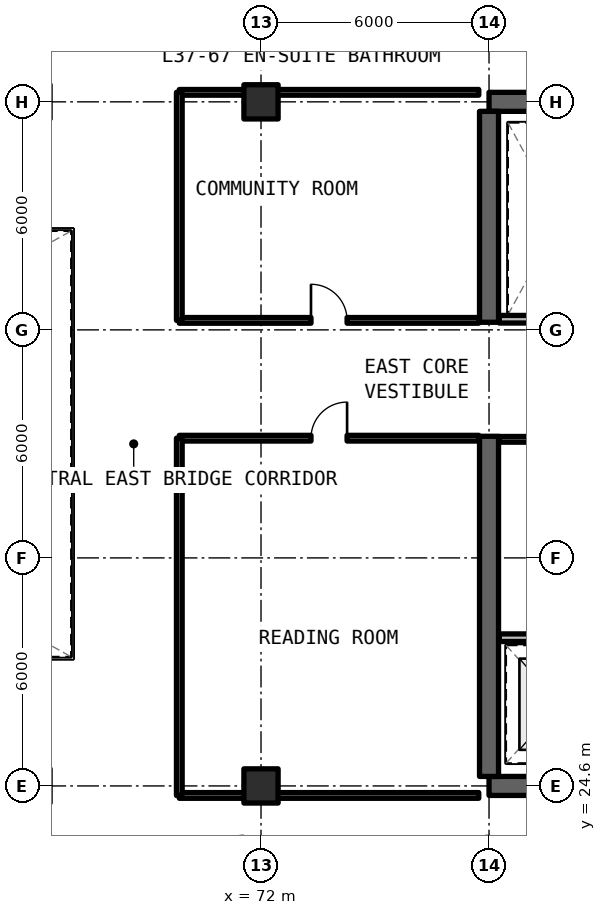
"""IFC4 building model, lengths in metres.
Left out: names, types, materials, properties, quantities, classifications, styles, units other than length and angle.
Written with IfcOpenShell. Run it as: python <this file> out.ifc"""

import sys

from ifc_helpers import new_model, si_unit, direction, frame, frame_2d, origin, origin_2d, place, context, subcontext, project, spatial, rectangle, extrude, element, fill, save


model = new_model("IFC4")
c1 = context("Model", 3, precision=1e-05, world=origin(), true_north=direction((0.0, 1.0)))
c2 = subcontext(c1, "Body", "Model", "MODEL_VIEW")
j1 = project(units=[si_unit("LENGTHUNIT", "METRE"), si_unit("PLANEANGLEUNIT", "RADIAN")], contexts=[c1])
p1 = place(None, origin())
s1 = spatial("IfcSite", under=j1, at=p1, CompositionType="ELEMENT")
p2 = place(p1, origin())
s2 = spatial("IfcBuilding", under=s1, at=p2, CompositionType="ELEMENT")
p3 = place(p2, frame((0.0, 0.0, 135.3)))
s3 = spatial("IfcBuildingStorey", under=s2, at=p3, CompositionType="ELEMENT", Elevation=135.3)
for number, where, z_axis, x_axis in (
    (1, (78.0, 24.6, 0.0), (0.0, 0.0, 1.0), (1.0, 0.0, 0.0)),
    (2, (90.0, 42.6, 0.0), (0.0, 0.0, 1.0), (-1.0, 0.0, 0.0)),
):
    element("IfcWall", number, at=place(p3, frame(where, z_axis=z_axis, x_axis=x_axis)), inside=s3, PredefinedType="SHEAR", context=c2, shape_type="SweptSolid", body=[
        extrude(rectangle(XDim=12.0, YDim=0.5, at=frame_2d((6.0, 0.0))), origin(), (0.0, 0.0, 1.0), 3.3),
    ])
p4 = place(p3, frame((78.0, 24.85, 0.0), z_axis=(0.0, 0.0, 1.0), x_axis=(0.0, 1.0, 0.0)))
e3 = element("IfcWall", 3, at=p4, inside=s3, PredefinedType="SHEAR", context=c2, shape_type="SweptSolid", body=[
    extrude(rectangle(XDim=8.95, YDim=0.5, at=frame_2d((4.475, 0.0))), origin(), (0.0, 0.0, 1.0), 3.3),
])
p5 = place(p3, frame((78.0, 36.8, 0.0), z_axis=(0.0, 0.0, 1.0), x_axis=(0.0, 1.0, 0.0)))
e4 = element("IfcWall", 4, at=p5, inside=s3, PredefinedType="SHEAR", context=c2, shape_type="SweptSolid", body=[
    extrude(rectangle(XDim=5.55, YDim=0.5, at=frame_2d((2.775, 0.0))), origin(), (0.0, 0.0, 1.0), 3.3),
])
for number, where, z_axis, x_axis in (
    (5, (72.0, 24.6, 0.0), (0.0, 0.0, 1.0), (1.0, 0.0, 0.0)),
    (6, (72.0, 42.6, 0.0), (0.0, 0.0, 1.0), (1.0, 0.0, 0.0)),
):
    element("IfcColumn", number, at=place(p3, frame(where, z_axis=z_axis, x_axis=x_axis)), inside=s3, PredefinedType="COLUMN", context=c2, shape_type="SweptSolid", body=[
        extrude(rectangle(XDim=0.9, YDim=0.9, at=origin_2d()), origin(), (0.0, 0.0, 1.0), 3.3),
    ])
p6 = place(p3, frame((78.27, 28.5, 0.0), z_axis=(0.0, 0.0, 1.0), x_axis=(1.0, 0.0, 0.0)))
e7 = element("IfcWall", 7, at=p6, inside=s3, PredefinedType="SOLIDWALL", context=c2, shape_type="SweptSolid", body=[
    extrude(rectangle(XDim=7.51, YDim=0.2, at=frame_2d((3.755, 0.0))), origin(), (0.0, 0.0, 1.0), 2.35),
])
p7 = place(p6, frame((3.53, 0.0, 0.0)))
e8 = element("IfcOpeningElement", 8, at=p7, cuts=e7, PredefinedType="OPENING", context=c2, shape_type="SweptSolid", body=[
    extrude(rectangle(XDim=1.0, YDim=2.15, at=frame_2d((0.5, 1.075))), frame((0.0, 0.11, 0.0), z_axis=(0.0, -1.0, 0.0), x_axis=(1.0, 0.0, 0.0)), (0.0, 0.0, 1.0), 0.22),
])
p8 = place(p3, frame((78.27, 33.72, 0.0), z_axis=(0.0, 0.0, 1.0), x_axis=(1.0, 0.0, 0.0)))
e9 = element("IfcWall", 9, at=p8, inside=s3, PredefinedType="SOLIDWALL", context=c2, shape_type="SweptSolid", body=[
    extrude(rectangle(XDim=3.05, YDim=0.15, at=frame_2d((1.525, 0.0))), origin(), (0.0, 0.0, 1.0), 2.35),
])
p9 = place(p3, frame((78.27, 36.88, 0.0), z_axis=(0.0, 0.0, 1.0), x_axis=(1.0, 0.0, 0.0)))
e10 = element("IfcWall", 10, at=p9, inside=s3, PredefinedType="SOLIDWALL", context=c2, shape_type="SweptSolid", body=[
    extrude(rectangle(XDim=3.05, YDim=0.2, at=frame_2d((1.525, 0.0))), origin(), (0.0, 0.0, 1.0), 2.35),
])
p10 = place(p3, frame((69.85, 24.35, 0.0), z_axis=(0.0, 0.0, 1.0), x_axis=(1.0, 0.0, 0.0)))
e11 = element("IfcWall", 11, at=p10, inside=s3, PredefinedType="SOLIDWALL", context=c2, shape_type="SweptSolid", body=[
    extrude(rectangle(XDim=7.88, YDim=0.15, at=frame_2d((3.94, 0.0))), origin(), (0.0, 0.0, 1.0), 2.35),
])
p11 = place(p3, frame((69.85, 33.75, 0.0), z_axis=(0.0, 0.0, 1.0), x_axis=(1.0, 0.0, 0.0)))
e12 = element("IfcWall", 12, at=p11, inside=s3, PredefinedType="SOLIDWALL", context=c2, shape_type="SweptSolid", body=[
    extrude(rectangle(XDim=7.88, YDim=0.15, at=frame_2d((3.94, 0.0))), origin(), (0.0, 0.0, 1.0), 2.35),
])
p12 = place(p11, frame((3.465, 0.0, 0.0)))
e13 = element("IfcOpeningElement", 13, at=p12, cuts=e12, PredefinedType="OPENING", context=c2, shape_type="SweptSolid", body=[
    extrude(rectangle(XDim=0.95, YDim=2.15, at=frame_2d((0.475, 1.075))), frame((0.0, 0.085, 0.0), z_axis=(0.0, -1.0, 0.0), x_axis=(1.0, 0.0, 0.0)), (0.0, 0.0, 1.0), 0.17),
])
p13 = place(p3, frame((69.85, 24.35, 0.0), z_axis=(0.0, 0.0, 1.0), x_axis=(0.0, 1.0, 0.0)))
e14 = element("IfcWall", 14, at=p13, inside=s3, PredefinedType="SOLIDWALL", context=c2, shape_type="SweptSolid", body=[
    extrude(rectangle(XDim=9.4, YDim=0.15, at=frame_2d((4.7, 0.0))), origin(), (0.0, 0.0, 1.0), 2.35),
])
p14 = place(p3, frame((69.85, 36.85, 0.0), z_axis=(0.0, 0.0, 1.0), x_axis=(1.0, 0.0, 0.0)))
e15 = element("IfcWall", 15, at=p14, inside=s3, PredefinedType="SOLIDWALL", context=c2, shape_type="SweptSolid", body=[
    extrude(rectangle(XDim=7.88, YDim=0.15, at=frame_2d((3.94, 0.0))), origin(), (0.0, 0.0, 1.0), 2.35),
])
p15 = place(p14, frame((3.465, 0.0, 0.0)))
e16 = element("IfcOpeningElement", 16, at=p15, cuts=e15, PredefinedType="OPENING", context=c2, shape_type="SweptSolid", body=[
    extrude(rectangle(XDim=0.95, YDim=2.15, at=frame_2d((0.475, 1.075))), frame((0.0, 0.085, 0.0), z_axis=(0.0, -1.0, 0.0), x_axis=(1.0, 0.0, 0.0)), (0.0, 0.0, 1.0), 0.17),
])
p16 = place(p3, frame((69.85, 42.85, 0.0), z_axis=(0.0, 0.0, 1.0), x_axis=(1.0, 0.0, 0.0)))
e17 = element("IfcWall", 17, at=p16, inside=s3, PredefinedType="SOLIDWALL", context=c2, shape_type="SweptSolid", body=[
    extrude(rectangle(XDim=7.88, YDim=0.15, at=frame_2d((3.94, 0.0))), origin(), (0.0, 0.0, 1.0), 2.35),
])
p17 = place(p3, frame((69.85, 36.85, 0.0), z_axis=(0.0, 0.0, 1.0), x_axis=(0.0, 1.0, 0.0)))
e18 = element("IfcWall", 18, at=p17, inside=s3, PredefinedType="SOLIDWALL", context=c2, shape_type="SweptSolid", body=[
    extrude(rectangle(XDim=6.0, YDim=0.15, at=frame_2d((3.0, 0.0))), origin(), (0.0, 0.0, 1.0), 2.35),
])
p18 = place(p12, origin())
e19 = element("IfcDoor", 19, at=p18, inside=s3, OperationType="SINGLE_SWING_RIGHT", PredefinedType="DOOR", context=c2, shape_type="SweptSolid", body=[
    extrude(rectangle(XDim=0.95, YDim=2.15, at=frame_2d((0.475, 1.075))), frame((0.0, 0.025, 0.0), z_axis=(0.0, -1.0, 0.0), x_axis=(1.0, 0.0, 0.0)), (0.0, 0.0, 1.0), 0.05),
])
fill(e13, e19)
p19 = place(p15, origin())
e20 = element("IfcDoor", 20, at=p19, inside=s3, OperationType="SINGLE_SWING_LEFT", PredefinedType="DOOR", context=c2, shape_type="SweptSolid", body=[
    extrude(rectangle(XDim=0.95, YDim=2.15, at=frame_2d((0.475, 1.075))), frame((0.0, 0.025, 0.0), z_axis=(0.0, -1.0, 0.0), x_axis=(1.0, 0.0, 0.0)), (0.0, 0.0, 1.0), 0.05),
])
fill(e16, e20)
save(model, sys.argv[1])
